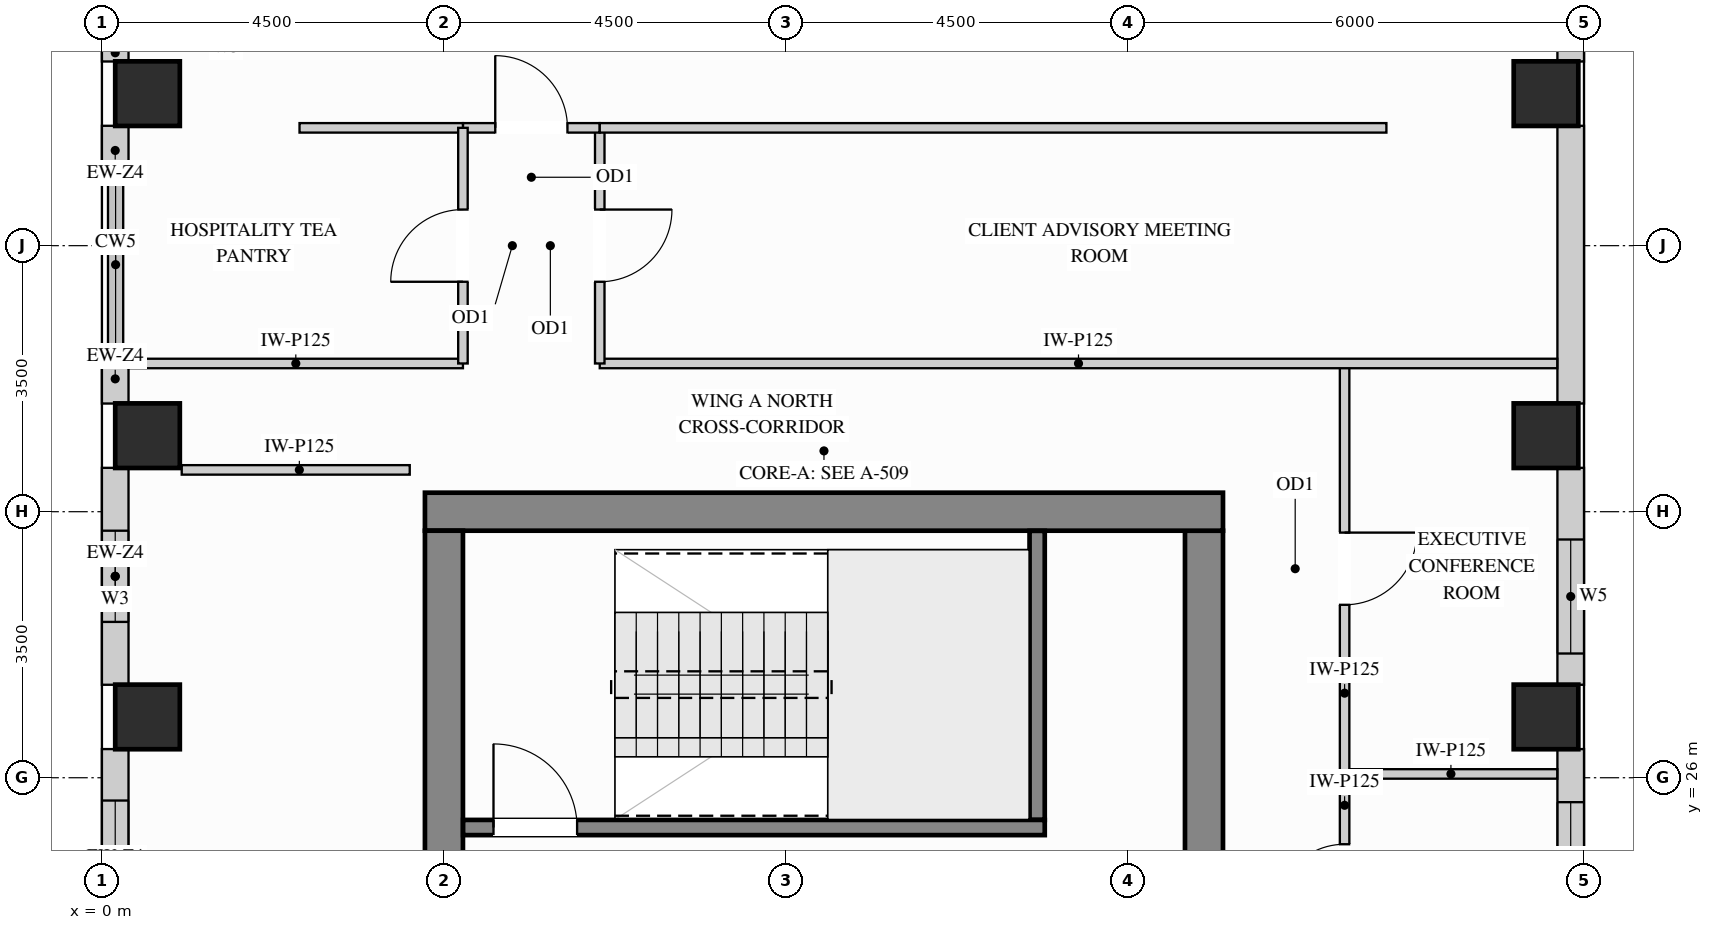
"""IFC4 building model, lengths in metres.
Left out: names, types, materials, properties, quantities, classifications, styles, units other than length and angle.
Written with IfcOpenShell. Run it as: python <this file> out.ifc"""

import sys

from ifc_helpers import new_model, si_unit, direction, frame, frame_2d, origin, origin_2d, place, context, subcontext, project, spatial, rectangle, extrude, source, transform, mapped, element, fill, save


model = new_model("IFC4")
c1 = context("Model", 3, precision=1e-05, world=origin(), true_north=direction((0.0, 1.0)))
c2 = subcontext(c1, "Body", "Model", "MODEL_VIEW")
j1 = project(units=[si_unit("LENGTHUNIT", "METRE"), si_unit("PLANEANGLEUNIT", "RADIAN")], contexts=[c1])
p1 = place(None, origin())
s1 = spatial("IfcSite", under=j1, at=p1, CompositionType="ELEMENT")
p2 = place(p1, origin())
s2 = spatial("IfcBuilding", under=s1, at=p2, CompositionType="ELEMENT")
p3 = place(p2, frame((0.0, 0.0, 270.0)))
s3 = spatial("IfcBuildingStorey", under=s2, at=p3, CompositionType="ELEMENT", Elevation=270.0)
m1 = source(origin(), c2, "Body", "SweptSolid", [
    extrude(rectangle(XDim=0.85, YDim=0.85, at=origin_2d()), origin(), (0.0, 0.0, 1.0), 3.4),
])
for number, where, z_axis, x_axis in (
    (1, (19.0, 26.8, 0.0), (0.0, 0.0, 1.0), (1.0, 0.0, 0.0)),
    (2, (19.0, 30.5, 0.0), (0.0, 0.0, 1.0), (1.0, 0.0, 0.0)),
    (3, (19.0, 35.0, 0.0), (0.0, 0.0, 1.0), (1.0, 0.0, 0.0)),
    (4, (0.6, 26.8, 0.0), (0.0, 0.0, 1.0), (1.0, 0.0, 0.0)),
    (5, (0.6, 30.5, 0.0), (0.0, 0.0, 1.0), (1.0, 0.0, 0.0)),
    (6, (0.6, 35.0, 0.0), (0.0, 0.0, 1.0), (1.0, 0.0, 0.0)),
):
    element("IfcColumn", number, at=place(p3, frame(where, z_axis=z_axis, x_axis=x_axis)), inside=s3, PredefinedType="COLUMN", context=c2, shape_type="MappedRepresentation", body=[
        mapped(m1, transform((0.0, 0.0, 0.0), x_axis=(1.0, 0.0, 0.0), y_axis=(0.0, 1.0, 0.0), z_axis=(0.0, 0.0, 1.0))),
    ])
m2 = source(origin(), c2, "Body", "SweptSolid", [
    extrude(rectangle(XDim=8.37, YDim=0.5, at=frame_2d((4.185, 0.0))), origin(), (0.0, 0.0, 1.0), 3.4),
])
p4 = place(p3, frame((14.5, 20.88, 0.0), z_axis=(0.0, 0.0, 1.0), x_axis=(0.0, 1.0, 0.0)))
e7 = element("IfcWall", 7, at=p4, inside=s3, PredefinedType="SHEAR", context=c2, shape_type="MappedRepresentation", body=[
    mapped(m2, transform((0.0, 0.0, 0.0), x_axis=(1.0, 0.0, 0.0), y_axis=(0.0, 1.0, 0.0), z_axis=(0.0, 0.0, 1.0))),
])
m3 = source(origin(), c2, "Body", "SweptSolid", [
    extrude(rectangle(XDim=10.5, YDim=0.5, at=frame_2d((5.25, 0.0))), origin(), (0.0, 0.0, 1.0), 3.4),
])
p5 = place(p3, frame((4.25, 29.5, 0.0), z_axis=(0.0, 0.0, 1.0), x_axis=(1.0, 0.0, 0.0)))
e8 = element("IfcWall", 8, at=p5, inside=s3, PredefinedType="SHEAR", context=c2, shape_type="MappedRepresentation", body=[
    mapped(m3, transform((0.0, 0.0, 0.0), x_axis=(1.0, 0.0, 0.0), y_axis=(0.0, 1.0, 0.0), z_axis=(0.0, 0.0, 1.0))),
])
m4 = source(origin(), c2, "Body", "SweptSolid", [
    extrude(rectangle(XDim=20.5, YDim=0.5, at=frame_2d((10.25, 0.0))), origin(), (0.0, 0.0, 1.0), 3.4),
])
p6 = place(p3, frame((4.5, 8.75, 0.0), z_axis=(0.0, 0.0, 1.0), x_axis=(0.0, 1.0, 0.0)))
e9 = element("IfcWall", 9, at=p6, inside=s3, PredefinedType="SHEAR", context=c2, shape_type="MappedRepresentation", body=[
    mapped(m4, transform((0.0, 0.0, 0.0), x_axis=(1.0, 0.0, 0.0), y_axis=(0.0, 1.0, 0.0), z_axis=(0.0, 0.0, 1.0))),
])
m5 = source(origin(), c2, "Body", "SweptSolid", [
    extrude(rectangle(XDim=0.229, YDim=0.35, at=frame_2d((0.115, 0.0))), origin(), (0.0, 0.0, 1.0), 3.385),
])
p7 = place(p3, frame((0.175, 35.652, 0.0), z_axis=(0.0, 0.0, 1.0), x_axis=(0.0, -1.0, 0.0)))
e10 = element("IfcWall", 10, at=p7, inside=s3, PredefinedType="SOLIDWALL", context=c2, shape_type="MappedRepresentation", body=[
    mapped(m5, transform((0.0, 0.0, 0.0), x_axis=(1.0, 0.0, 0.0), y_axis=(0.0, 1.0, 0.0), z_axis=(0.0, 0.0, 1.0))),
])
m6 = source(origin(), c2, "Body", "SweptSolid", [
    extrude(rectangle(XDim=0.527, YDim=0.35, at=frame_2d((0.263, 0.0))), origin(), (0.0, 0.0, 1.0), 3.385),
])
for number, where, z_axis, x_axis in (
    (11, (0.175, 34.577, 0.0), (0.0, 0.0, 1.0), (0.0, -1.0, 0.0)),
    (12, (0.175, 31.45, 0.0), (0.0, 0.0, 1.0), (0.0, -1.0, 0.0)),
):
    element("IfcWall", number, at=place(p3, frame(where, z_axis=z_axis, x_axis=x_axis)), inside=s3, PredefinedType="SOLIDWALL", context=c2, shape_type="MappedRepresentation", body=[
        mapped(m6, transform((0.0, 0.0, 0.0), x_axis=(1.0, 0.0, 0.0), y_axis=(0.0, 1.0, 0.0), z_axis=(0.0, 0.0, 1.0))),
    ])
p8 = place(p3, frame((0.175, 30.077, 0.0), z_axis=(0.0, 0.0, 1.0), x_axis=(0.0, -1.0, 0.0)))
e13 = element("IfcWall", 13, at=p8, inside=s3, PredefinedType="SOLIDWALL", context=c2, shape_type="SweptSolid", body=[
    extrude(rectangle(XDim=2.854, YDim=0.35, at=frame_2d((1.427, 0.0))), origin(), (0.0, 0.0, 1.0), 3.385),
])
p9 = place(p8, frame((0.827, 0.0, 0.78)))
e14 = element("IfcOpeningElement", 14, at=p9, cuts=e13, PredefinedType="OPENING", context=c2, shape_type="SweptSolid", body=[
    extrude(rectangle(XDim=1.2, YDim=2.25, at=frame_2d((0.6, 1.125))), frame((0.0, 0.185, 0.0), z_axis=(0.0, -1.0, 0.0), x_axis=(1.0, 0.0, 0.0)), (0.0, 0.0, 1.0), 0.37),
])
p10 = place(p3, frame((0.175, 26.377, 0.0), z_axis=(0.0, 0.0, 1.0), x_axis=(0.0, -1.0, 0.0)))
e15 = element("IfcWall", 15, at=p10, inside=s3, PredefinedType="SOLIDWALL", context=c2, shape_type="SweptSolid", body=[
    extrude(rectangle(XDim=3.454, YDim=0.35, at=frame_2d((1.727, 0.0))), origin(), (0.0, 0.0, 1.0), 3.385),
])
p11 = place(p10, frame((0.677, 0.0, 0.78)))
e16 = element("IfcOpeningElement", 16, at=p11, cuts=e15, PredefinedType="OPENING", context=c2, shape_type="SweptSolid", body=[
    extrude(rectangle(XDim=2.1, YDim=2.25, at=frame_2d((1.05, 1.125))), frame((0.0, 0.185, 0.0), z_axis=(0.0, -1.0, 0.0), x_axis=(1.0, 0.0, 0.0)), (0.0, 0.0, 1.0), 0.37),
])
p12 = place(p3, frame((19.325, 22.923, 0.0), z_axis=(0.0, 0.0, 1.0), x_axis=(0.0, 1.0, 0.0)))
e17 = element("IfcWall", 17, at=p12, inside=s3, PredefinedType="SOLIDWALL", context=c2, shape_type="SweptSolid", body=[
    extrude(rectangle(XDim=3.454, YDim=0.35, at=frame_2d((1.727, 0.0))), origin(), (0.0, 0.0, 1.0), 2.619),
])
p13 = place(p12, frame((1.256, 0.0, 0.78)))
e18 = element("IfcOpeningElement", 18, at=p13, cuts=e17, PredefinedType="OPENING", context=c2, shape_type="SweptSolid", body=[
    extrude(rectangle(XDim=1.5, YDim=1.659, at=frame_2d((0.75, 0.83))), frame((0.0, 0.185, 0.0), z_axis=(0.0, -1.0, 0.0), x_axis=(1.0, 0.0, 0.0)), (0.0, 0.0, 1.0), 0.37),
])
p14 = place(p3, frame((19.325, 27.223, 0.0), z_axis=(0.0, 0.0, 1.0), x_axis=(0.0, 1.0, 0.0)))
e19 = element("IfcWall", 19, at=p14, inside=s3, PredefinedType="SOLIDWALL", context=c2, shape_type="SweptSolid", body=[
    extrude(rectangle(XDim=2.854, YDim=0.35, at=frame_2d((1.427, 0.0))), origin(), (0.0, 0.0, 1.0), 2.619),
])
p15 = place(p14, frame((0.411, 0.0, 0.78)))
e20 = element("IfcOpeningElement", 20, at=p15, cuts=e19, PredefinedType="OPENING", context=c2, shape_type="SweptSolid", body=[
    extrude(rectangle(XDim=1.5, YDim=1.659, at=frame_2d((0.75, 0.83))), frame((0.0, 0.185, 0.0), z_axis=(0.0, -1.0, 0.0), x_axis=(1.0, 0.0, 0.0)), (0.0, 0.0, 1.0), 0.37),
])
m7 = source(origin(), c2, "Body", "SweptSolid", [
    extrude(rectangle(XDim=3.654, YDim=0.35, at=frame_2d((1.827, 0.0))), origin(), (0.0, 0.0, 1.0), 2.619),
])
p16 = place(p3, frame((19.325, 30.923, 0.0), z_axis=(0.0, 0.0, 1.0), x_axis=(0.0, 1.0, 0.0)))
e21 = element("IfcWall", 21, at=p16, inside=s3, PredefinedType="SOLIDWALL", context=c2, shape_type="MappedRepresentation", body=[
    mapped(m7, transform((0.0, 0.0, 0.0), x_axis=(1.0, 0.0, 0.0), y_axis=(0.0, 1.0, 0.0), z_axis=(0.0, 0.0, 1.0))),
])
p17 = place(p3, frame((19.325, 35.423, 0.0), z_axis=(0.0, 0.0, 1.0), x_axis=(0.0, 1.0, 0.0)))
e22 = element("IfcWall", 22, at=p17, inside=s3, PredefinedType="SOLIDWALL", context=c2, shape_type="MappedRepresentation", body=[
    mapped(m5, transform((0.0, 0.0, 0.0), x_axis=(1.0, 0.0, 0.0), y_axis=(0.0, 1.0, 0.0), z_axis=(0.0, 0.0, 1.0))),
])
m8 = source(origin(), c2, "Body", "SweptSolid", [
    extrude(rectangle(XDim=2.798, YDim=0.125, at=frame_2d((1.399, 0.0))), origin(), (0.0, 0.0, 1.0), 3.385),
])
p18 = place(p3, frame((16.35, 26.05, 0.0), z_axis=(0.0, 0.0, 1.0), x_axis=(1.0, 0.0, 0.0)))
e23 = element("IfcWall", 23, at=p18, inside=s3, PredefinedType="PARTITIONING", context=c2, shape_type="MappedRepresentation", body=[
    mapped(m8, transform((0.0, 0.0, 0.0), x_axis=(1.0, 0.0, 0.0), y_axis=(0.0, 1.0, 0.0), z_axis=(0.0, 0.0, 1.0))),
])
p19 = place(p3, frame((16.35, 26.05, 0.0), z_axis=(0.0, 0.0, 1.0), x_axis=(0.0, 1.0, 0.0)))
e24 = element("IfcWall", 24, at=p19, inside=s3, PredefinedType="PARTITIONING", context=c2, shape_type="SweptSolid", body=[
    extrude(rectangle(XDim=5.4, YDim=0.125, at=frame_2d((2.7, 0.0))), origin(), (0.0, 0.0, 1.0), 3.385),
])
p20 = place(p19, frame((2.225, 0.0, 0.0)))
e25 = element("IfcOpeningElement", 25, at=p20, cuts=e24, PredefinedType="OPENING", context=c2, shape_type="SweptSolid", body=[
    extrude(rectangle(XDim=0.95, YDim=2.15, at=frame_2d((0.475, 1.075))), frame((0.0, 0.073, 0.0), z_axis=(0.0, -1.0, 0.0), x_axis=(1.0, 0.0, 0.0)), (0.0, 0.0, 1.0), 0.145),
])
p21 = place(p3, frame((16.35, 23.35, 0.0), z_axis=(0.0, 0.0, 1.0), x_axis=(0.0, 1.0, 0.0)))
e26 = element("IfcWall", 26, at=p21, inside=s3, PredefinedType="PARTITIONING", context=c2, shape_type="SweptSolid", body=[
    extrude(rectangle(XDim=2.7, YDim=0.125, at=frame_2d((1.35, 0.0))), origin(), (0.0, 0.0, 1.0), 3.385),
])
p22 = place(p21, frame((0.875, 0.0, 0.0)))
e27 = element("IfcOpeningElement", 27, at=p22, cuts=e26, PredefinedType="OPENING", context=c2, shape_type="SweptSolid", body=[
    extrude(rectangle(XDim=0.9, YDim=2.15, at=frame_2d((0.45, 1.075))), frame((0.0, 0.073, 0.0), z_axis=(0.0, -1.0, 0.0), x_axis=(1.0, 0.0, 0.0)), (0.0, 0.0, 1.0), 0.145),
])
m9 = source(origin(), c2, "Body", "SweptSolid", [
    extrude(rectangle(XDim=12.598, YDim=0.125, at=frame_2d((6.299, 0.0))), origin(), (0.0, 0.0, 1.0), 3.385),
])
p23 = place(p3, frame((6.55, 31.45, 0.0), z_axis=(0.0, 0.0, 1.0), x_axis=(1.0, 0.0, 0.0)))
e28 = element("IfcWall", 28, at=p23, inside=s3, PredefinedType="PARTITIONING", context=c2, shape_type="MappedRepresentation", body=[
    mapped(m9, transform((0.0, 0.0, 0.0), x_axis=(1.0, 0.0, 0.0), y_axis=(0.0, 1.0, 0.0), z_axis=(0.0, 0.0, 1.0))),
])
m10 = source(origin(), c2, "Body", "SweptSolid", [
    extrude(rectangle(XDim=4.398, YDim=0.125, at=frame_2d((2.199, 0.0))), origin(), (0.0, 0.0, 1.0), 3.385),
])
p24 = place(p3, frame((0.352, 31.45, 0.0), z_axis=(0.0, 0.0, 1.0), x_axis=(1.0, 0.0, 0.0)))
e29 = element("IfcWall", 29, at=p24, inside=s3, PredefinedType="PARTITIONING", context=c2, shape_type="MappedRepresentation", body=[
    mapped(m10, transform((0.0, 0.0, 0.0), x_axis=(1.0, 0.0, 0.0), y_axis=(0.0, 1.0, 0.0), z_axis=(0.0, 0.0, 1.0))),
])
m11 = source(origin(), c2, "Body", "SweptSolid", [
    extrude(rectangle(XDim=3.0, YDim=0.125, at=frame_2d((1.5, 0.0))), origin(), (0.0, 0.0, 1.0), 3.385),
])
p25 = place(p3, frame((1.05, 30.05, 0.0), z_axis=(0.0, 0.0, 1.0), x_axis=(1.0, 0.0, 0.0)))
e30 = element("IfcWall", 30, at=p25, inside=s3, PredefinedType="PARTITIONING", context=c2, shape_type="MappedRepresentation", body=[
    mapped(m11, transform((0.0, 0.0, 0.0), x_axis=(1.0, 0.0, 0.0), y_axis=(0.0, 1.0, 0.0), z_axis=(0.0, 0.0, 1.0))),
])
p26 = place(p3, frame((6.55, 31.45, 0.0), z_axis=(0.0, 0.0, 1.0), x_axis=(0.0, 1.0, 0.0)))
e31 = element("IfcWall", 31, at=p26, inside=s3, PredefinedType="PARTITIONING", context=c2, shape_type="SweptSolid", body=[
    extrude(rectangle(XDim=3.1, YDim=0.125, at=frame_2d((1.55, 0.0))), origin(), (0.0, 0.0, 1.0), 3.385),
])
p27 = place(p26, frame((1.075, 0.0, 0.0)))
e32 = element("IfcOpeningElement", 32, at=p27, cuts=e31, PredefinedType="OPENING", context=c2, shape_type="SweptSolid", body=[
    extrude(rectangle(XDim=0.95, YDim=2.15, at=frame_2d((0.475, 1.075))), frame((0.0, 0.073, 0.0), z_axis=(0.0, -1.0, 0.0), x_axis=(1.0, 0.0, 0.0)), (0.0, 0.0, 1.0), 0.145),
])
p28 = place(p3, frame((4.75, 34.55, 0.0), z_axis=(0.0, 0.0, 1.0), x_axis=(1.0, 0.0, 0.0)))
e33 = element("IfcWall", 33, at=p28, inside=s3, PredefinedType="PARTITIONING", context=c2, shape_type="SweptSolid", body=[
    extrude(rectangle(XDim=1.8, YDim=0.125, at=frame_2d((0.9, 0.0))), origin(), (0.0, 0.0, 1.0), 3.385),
])
p29 = place(p28, frame((0.425, 0.0, 0.0)))
e34 = element("IfcOpeningElement", 34, at=p29, cuts=e33, PredefinedType="OPENING", context=c2, shape_type="SweptSolid", body=[
    extrude(rectangle(XDim=0.95, YDim=2.15, at=frame_2d((0.475, 1.075))), frame((0.0, 0.073, 0.0), z_axis=(0.0, -1.0, 0.0), x_axis=(1.0, 0.0, 0.0)), (0.0, 0.0, 1.0), 0.145),
])
m12 = source(origin(), c2, "Body", "SweptSolid", [
    extrude(rectangle(XDim=10.35, YDim=0.125, at=frame_2d((5.175, 0.0))), origin(), (0.0, 0.0, 1.0), 3.385),
])
p30 = place(p3, frame((6.55, 34.55, 0.0), z_axis=(0.0, 0.0, 1.0), x_axis=(1.0, 0.0, 0.0)))
e35 = element("IfcWall", 35, at=p30, inside=s3, PredefinedType="PARTITIONING", context=c2, shape_type="MappedRepresentation", body=[
    mapped(m12, transform((0.0, 0.0, 0.0), x_axis=(1.0, 0.0, 0.0), y_axis=(0.0, 1.0, 0.0), z_axis=(0.0, 0.0, 1.0))),
])
m13 = source(origin(), c2, "Body", "SweptSolid", [
    extrude(rectangle(XDim=2.15, YDim=0.125, at=frame_2d((1.075, 0.0))), origin(), (0.0, 0.0, 1.0), 3.385),
])
p31 = place(p3, frame((2.6, 34.55, 0.0), z_axis=(0.0, 0.0, 1.0), x_axis=(1.0, 0.0, 0.0)))
e36 = element("IfcWall", 36, at=p31, inside=s3, PredefinedType="PARTITIONING", context=c2, shape_type="MappedRepresentation", body=[
    mapped(m13, transform((0.0, 0.0, 0.0), x_axis=(1.0, 0.0, 0.0), y_axis=(0.0, 1.0, 0.0), z_axis=(0.0, 0.0, 1.0))),
])
p32 = place(p3, frame((4.75, 31.45, 0.0), z_axis=(0.0, 0.0, 1.0), x_axis=(0.0, 1.0, 0.0)))
e37 = element("IfcWall", 37, at=p32, inside=s3, PredefinedType="PARTITIONING", context=c2, shape_type="SweptSolid", body=[
    extrude(rectangle(XDim=3.1, YDim=0.125, at=frame_2d((1.55, 0.0))), origin(), (0.0, 0.0, 1.0), 3.385),
])
p33 = place(p32, frame((1.075, 0.0, 0.0)))
e38 = element("IfcOpeningElement", 38, at=p33, cuts=e37, PredefinedType="OPENING", context=c2, shape_type="SweptSolid", body=[
    extrude(rectangle(XDim=0.95, YDim=2.15, at=frame_2d((0.475, 1.075))), frame((0.0, 0.073, 0.0), z_axis=(0.0, -1.0, 0.0), x_axis=(1.0, 0.0, 0.0)), (0.0, 0.0, 1.0), 0.145),
])
m14 = source(origin(), c2, "Body", "SweptSolid", [
    extrude(rectangle(XDim=3.803, YDim=0.2, at=frame_2d((1.901, 0.0))), origin(), (0.0, 0.0, 1.0), 3.4),
])
p34 = place(p3, frame((12.305, 25.445, 0.0), z_axis=(0.0, 0.0, 1.0), x_axis=(0.0, 1.0, 0.0)))
e39 = element("IfcWall", 39, at=p34, inside=s3, PredefinedType="SHEAR", context=c2, shape_type="MappedRepresentation", body=[
    mapped(m14, transform((0.0, 0.0, 0.0), x_axis=(1.0, 0.0, 0.0), y_axis=(0.0, 1.0, 0.0), z_axis=(0.0, 0.0, 1.0))),
])
p35 = place(p3, frame((4.752, 25.345, 0.0), z_axis=(0.0, 0.0, 1.0), x_axis=(1.0, 0.0, 0.0)))
e40 = element("IfcWall", 40, at=p35, inside=s3, PredefinedType="SHEAR", context=c2, shape_type="SweptSolid", body=[
    extrude(rectangle(XDim=7.653, YDim=0.2, at=frame_2d((3.827, 0.0))), origin(), (0.0, 0.0, 1.0), 3.4),
])
p36 = place(p35, frame((0.4, 0.0, 0.0)))
e41 = element("IfcOpeningElement", 41, at=p36, cuts=e40, PredefinedType="OPENING", context=c2, shape_type="SweptSolid", body=[
    extrude(rectangle(XDim=1.1, YDim=2.15, at=frame_2d((0.55, 1.075))), frame((0.0, 0.11, 0.0), z_axis=(0.0, -1.0, 0.0), x_axis=(1.0, 0.0, 0.0)), (0.0, 0.0, 1.0), 0.22),
])
m15 = source(origin(), c2, "Body", "SweptSolid", [
    extrude(rectangle(XDim=0.95, YDim=2.15, at=frame_2d((0.475, 1.075))), frame((0.0, 0.025, 0.0), z_axis=(0.0, -1.0, 0.0), x_axis=(1.0, 0.0, 0.0)), (0.0, 0.0, 1.0), 0.05),
])
p37 = place(p20, origin())
e42 = element("IfcDoor", 42, at=p37, inside=s3, OperationType="SINGLE_SWING_RIGHT", PredefinedType="DOOR", context=c2, shape_type="MappedRepresentation", body=[
    mapped(m15, transform((0.0, 0.0, 0.0), x_axis=(1.0, 0.0, 0.0), y_axis=(0.0, 1.0, 0.0), z_axis=(0.0, 0.0, 1.0))),
])
fill(e25, e42)
p38 = place(p27, origin())
e43 = element("IfcDoor", 43, at=p38, inside=s3, OperationType="SINGLE_SWING_RIGHT", PredefinedType="DOOR", context=c2, shape_type="MappedRepresentation", body=[
    mapped(m15, transform((0.0, 0.0, 0.0), x_axis=(1.0, 0.0, 0.0), y_axis=(0.0, 1.0, 0.0), z_axis=(0.0, 0.0, 1.0))),
])
fill(e32, e43)
p39 = place(p29, origin())
e44 = element("IfcDoor", 44, at=p39, inside=s3, OperationType="SINGLE_SWING_LEFT", PredefinedType="DOOR", context=c2, shape_type="MappedRepresentation", body=[
    mapped(m15, transform((0.0, 0.0, 0.0), x_axis=(1.0, 0.0, 0.0), y_axis=(0.0, 1.0, 0.0), z_axis=(0.0, 0.0, 1.0))),
])
fill(e34, e44)
p40 = place(p33, origin())
e45 = element("IfcDoor", 45, at=p40, inside=s3, OperationType="SINGLE_SWING_LEFT", PredefinedType="DOOR", context=c2, shape_type="MappedRepresentation", body=[
    mapped(m15, transform((0.0, 0.0, 0.0), x_axis=(1.0, 0.0, 0.0), y_axis=(0.0, 1.0, 0.0), z_axis=(0.0, 0.0, 1.0))),
])
fill(e38, e45)
m16 = source(origin(), c2, "Body", "SweptSolid", [
    extrude(rectangle(XDim=1.1, YDim=2.15, at=frame_2d((0.55, 1.075))), frame((0.0, 0.025, 0.0), z_axis=(0.0, -1.0, 0.0), x_axis=(1.0, 0.0, 0.0)), (0.0, 0.0, 1.0), 0.05),
])
p41 = place(p36, origin())
e46 = element("IfcDoor", 46, at=p41, inside=s3, OperationType="SINGLE_SWING_LEFT", PredefinedType="DOOR", context=c2, shape_type="MappedRepresentation", body=[
    mapped(m16, transform((0.0, 0.0, 0.0), x_axis=(1.0, 0.0, 0.0), y_axis=(0.0, 1.0, 0.0), z_axis=(0.0, 0.0, 1.0))),
])
fill(e41, e46)
m17 = source(origin(), c2, "Body", "SweptSolid", [
    extrude(rectangle(XDim=0.9, YDim=2.15, at=frame_2d((0.45, 1.075))), frame((0.0, 0.025, 0.0), z_axis=(0.0, -1.0, 0.0), x_axis=(1.0, 0.0, 0.0)), (0.0, 0.0, 1.0), 0.05),
])
p42 = place(p22, origin())
e47 = element("IfcDoor", 47, at=p42, inside=s3, OperationType="SINGLE_SWING_LEFT", PredefinedType="DOOR", context=c2, shape_type="MappedRepresentation", body=[
    mapped(m17, transform((0.0, 0.0, 0.0), x_axis=(1.0, 0.0, 0.0), y_axis=(0.0, 1.0, 0.0), z_axis=(0.0, 0.0, 1.0))),
])
fill(e27, e47)
m18 = source(origin(), c2, "Body", "SweptSolid", [
    extrude(rectangle(XDim=1.2, YDim=2.25, at=frame_2d((0.6, 1.125))), frame((0.0, 0.03, 0.0), z_axis=(0.0, -1.0, 0.0), x_axis=(1.0, 0.0, 0.0)), (0.0, 0.0, 1.0), 0.06),
])
p43 = place(p9, origin())
e48 = element("IfcWindow", 48, at=p43, inside=s3, PartitioningType="SINGLE_PANEL", PredefinedType="WINDOW", context=c2, shape_type="MappedRepresentation", body=[
    mapped(m18, transform((0.0, 0.0, 0.0), x_axis=(1.0, 0.0, 0.0), y_axis=(0.0, 1.0, 0.0), z_axis=(0.0, 0.0, 1.0))),
])
fill(e14, e48)
m19 = source(origin(), c2, "Body", "SweptSolid", [
    extrude(rectangle(XDim=1.5, YDim=1.659, at=frame_2d((0.75, 0.83))), frame((0.0, 0.03, 0.0), z_axis=(0.0, -1.0, 0.0), x_axis=(1.0, 0.0, 0.0)), (0.0, 0.0, 1.0), 0.06),
])
p44 = place(p13, origin())
e49 = element("IfcWindow", 49, at=p44, inside=s3, PartitioningType="SINGLE_PANEL", PredefinedType="WINDOW", context=c2, shape_type="MappedRepresentation", body=[
    mapped(m19, transform((0.0, 0.0, 0.0), x_axis=(1.0, 0.0, 0.0), y_axis=(0.0, 1.0, 0.0), z_axis=(0.0, 0.0, 1.0))),
])
fill(e18, e49)
p45 = place(p15, origin())
e50 = element("IfcWindow", 50, at=p45, inside=s3, PartitioningType="SINGLE_PANEL", PredefinedType="WINDOW", context=c2, shape_type="MappedRepresentation", body=[
    mapped(m19, transform((0.0, 0.0, 0.0), x_axis=(1.0, 0.0, 0.0), y_axis=(0.0, 1.0, 0.0), z_axis=(0.0, 0.0, 1.0))),
])
fill(e20, e50)
m20 = source(origin(), c2, "Body", "SweptSolid", [
    extrude(rectangle(XDim=2.1, YDim=2.25, at=frame_2d((1.05, 1.125))), frame((0.0, 0.03, 0.0), z_axis=(0.0, -1.0, 0.0), x_axis=(1.0, 0.0, 0.0)), (0.0, 0.0, 1.0), 0.06),
])
p46 = place(p11, origin())
e51 = element("IfcWindow", 51, at=p46, inside=s3, PartitioningType="SINGLE_PANEL", PredefinedType="WINDOW", context=c2, shape_type="MappedRepresentation", body=[
    mapped(m20, transform((0.0, 0.0, 0.0), x_axis=(1.0, 0.0, 0.0), y_axis=(0.0, 1.0, 0.0), z_axis=(0.0, 0.0, 1.0))),
])
fill(e16, e51)
save(model, sys.argv[1])
